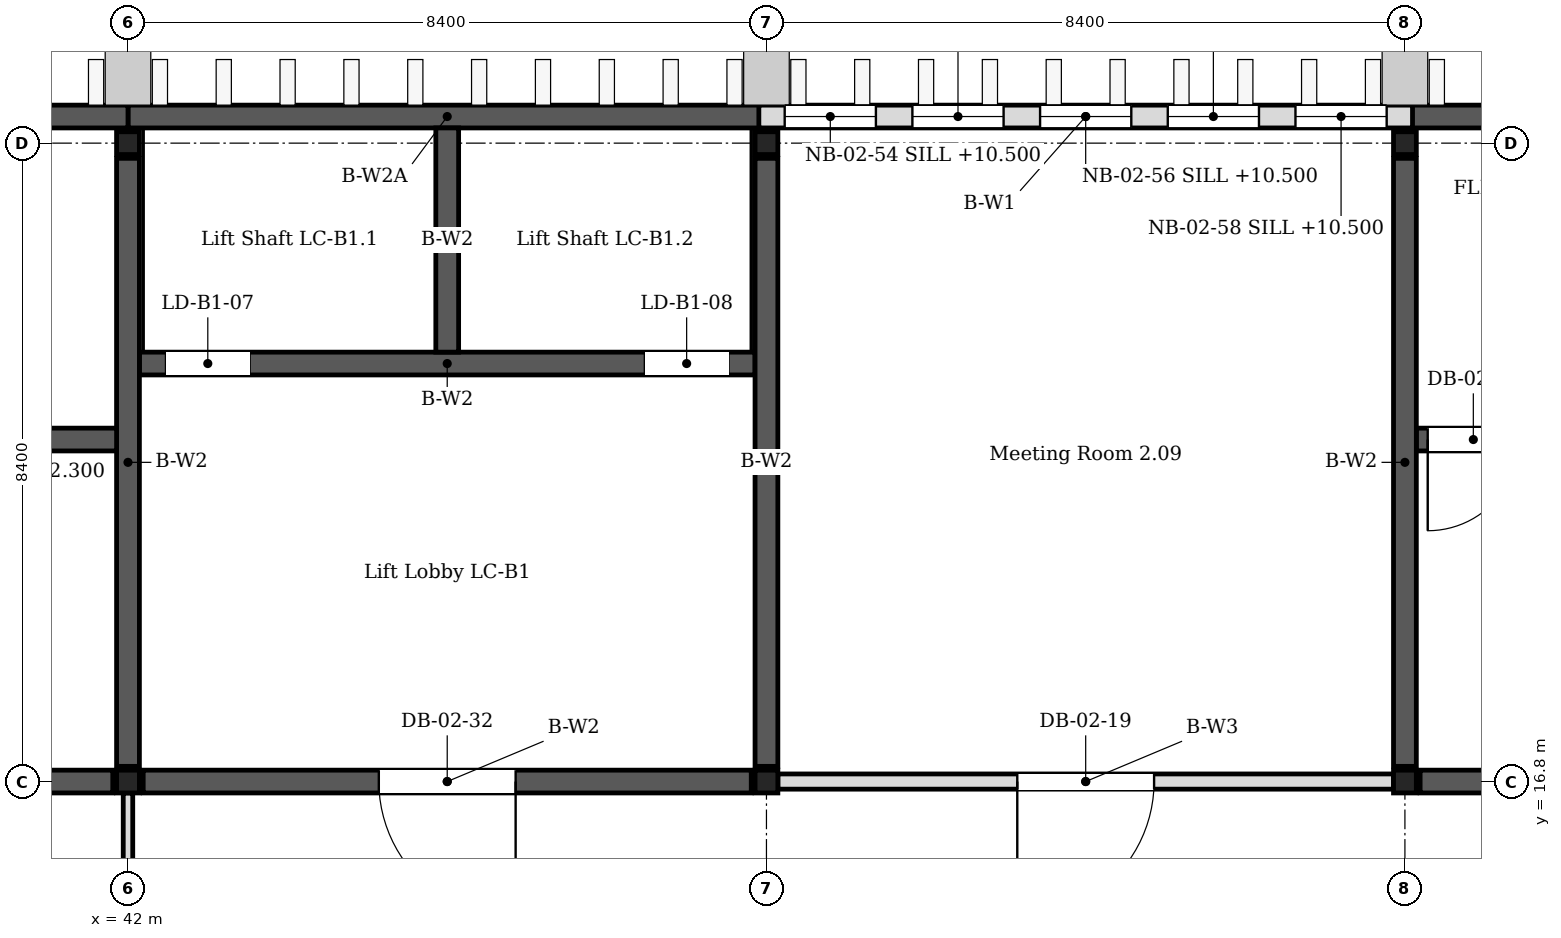
"""IFC4 building model, lengths in metres.
Left out: names, types, materials, properties, quantities, classifications, styles, units other than length and angle.
Written with IfcOpenShell. Run it as: python <this file> out.ifc"""

import sys

from ifc_helpers import new_model, si_unit, direction, frame, frame_2d, origin, origin_2d, place, context, subcontext, project, spatial, rectangle, i_section, extrude, element, fill, save


model = new_model("IFC4")
c1 = context("Model", 3, precision=1e-05, world=origin(), true_north=direction((0.0, 1.0)))
c2 = subcontext(c1, "Body", "Model", "MODEL_VIEW")
j1 = project(units=[si_unit("LENGTHUNIT", "METRE"), si_unit("PLANEANGLEUNIT", "RADIAN")], contexts=[c1])
p1 = place(None, origin())
s1 = spatial("IfcSite", under=j1, at=p1, CompositionType="ELEMENT")
p2 = place(p1, origin())
s2 = spatial("IfcBuilding", under=s1, at=p2, CompositionType="ELEMENT")
p3 = place(p2, frame((0.0, 0.0, 10.2)))
s3 = spatial("IfcBuildingStorey", under=s2, at=p3, CompositionType="ELEMENT", Elevation=10.2)
for number, where, z_axis, x_axis in (
    (1, (42.0, 16.8, 0.0), (0.0, 0.0, 1.0), (1.0, 0.0, 0.0)),
    (2, (42.0, 25.2, 0.0), (0.0, 0.0, 1.0), (1.0, 0.0, 0.0)),
    (3, (50.4, 16.8, 0.0), (0.0, 0.0, 1.0), (1.0, 0.0, 0.0)),
    (4, (50.4, 25.2, 0.0), (0.0, 0.0, 1.0), (1.0, 0.0, 0.0)),
    (5, (58.8, 16.8, 0.0), (0.0, 0.0, 1.0), (1.0, 0.0, 0.0)),
    (6, (58.8, 25.2, 0.0), (0.0, 0.0, 1.0), (1.0, 0.0, 0.0)),
):
    element("IfcColumn", number, at=place(p3, frame(where, z_axis=z_axis, x_axis=x_axis)), inside=s3, PredefinedType="COLUMN", context=c2, shape_type="SweptSolid", body=[
        extrude(i_section(OverallWidth=0.3, OverallDepth=0.3, WebThickness=0.01, FlangeThickness=0.015, FilletRadius=0.013, at=origin_2d()), origin(), (0.0, 0.0, 1.0), 4.2),
    ])
for number, where, z_axis, x_axis in (
    (7, (42.0, 17.0, 0.0), (0.0, 0.0, 1.0), (0.0, 1.0, 0.0)),
    (8, (50.4, 17.0, 0.0), (0.0, 0.0, 1.0), (0.0, 1.0, 0.0)),
):
    element("IfcWall", number, at=place(p3, frame(where, z_axis=z_axis, x_axis=x_axis)), inside=s3, PredefinedType="SHEAR", context=c2, shape_type="SweptSolid", body=[
        extrude(rectangle(XDim=8.0, YDim=0.3, at=frame_2d((4.0, 0.0))), origin(), (0.0, 0.0, 1.0), 4.05),
    ])
p4 = place(p3, frame((42.2, 16.8, 0.0), z_axis=(0.0, 0.0, 1.0), x_axis=(1.0, 0.0, 0.0)))
e9 = element("IfcWall", 9, at=p4, inside=s3, PredefinedType="SHEAR", context=c2, shape_type="SweptSolid", body=[
    extrude(rectangle(XDim=8.0, YDim=0.3, at=frame_2d((4.0, 0.0))), origin(), (0.0, 0.0, 1.0), 4.05),
])
p5 = place(p4, frame((3.1, 0.0, 0.0)))
e10 = element("IfcOpeningElement", 10, at=p5, cuts=e9, PredefinedType="OPENING", context=c2, shape_type="SweptSolid", body=[
    extrude(rectangle(XDim=1.8, YDim=2.1, at=frame_2d((0.9, 1.05))), frame((0.0, 0.16, 0.0), z_axis=(0.0, -1.0, 0.0), x_axis=(1.0, 0.0, 0.0)), (0.0, 0.0, 1.0), 0.32),
])
p6 = place(p3, frame((42.15, 22.3, 0.0), z_axis=(0.0, 0.0, 1.0), x_axis=(1.0, 0.0, 0.0)))
e11 = element("IfcWall", 11, at=p6, inside=s3, PredefinedType="SHEAR", context=c2, shape_type="SweptSolid", body=[
    extrude(rectangle(XDim=8.1, YDim=0.3, at=frame_2d((4.05, 0.0))), origin(), (0.0, 0.0, 1.0), 4.05),
])
p7 = place(p6, frame((0.35, 0.0, 0.0)))
e12 = element("IfcOpeningElement", 12, at=p7, cuts=e11, PredefinedType="OPENING", context=c2, shape_type="SweptSolid", body=[
    extrude(rectangle(XDim=1.1, YDim=2.2, at=frame_2d((0.55, 1.1))), frame((0.0, 0.16, 0.0), z_axis=(0.0, -1.0, 0.0), x_axis=(1.0, 0.0, 0.0)), (0.0, 0.0, 1.0), 0.32),
])
p8 = place(p6, frame((6.65, 0.0, 0.0)))
e13 = element("IfcOpeningElement", 13, at=p8, cuts=e11, PredefinedType="OPENING", context=c2, shape_type="SweptSolid", body=[
    extrude(rectangle(XDim=1.1, YDim=2.2, at=frame_2d((0.55, 1.1))), frame((0.0, 0.16, 0.0), z_axis=(0.0, -1.0, 0.0), x_axis=(1.0, 0.0, 0.0)), (0.0, 0.0, 1.0), 0.32),
])
p9 = place(p3, frame((42.0, 25.55, 0.0), z_axis=(0.0, 0.0, 1.0), x_axis=(1.0, 0.0, 0.0)))
e14 = element("IfcWall", 14, at=p9, inside=s3, PredefinedType="SHEAR", context=c2, shape_type="SweptSolid", body=[
    extrude(rectangle(XDim=8.4, YDim=0.3, at=frame_2d((4.2, 0.0))), origin(), (0.0, 0.0, 1.0), 4.05),
])
p10 = place(p3, frame((46.2, 22.45, 0.0), z_axis=(0.0, 0.0, 1.0), x_axis=(0.0, 1.0, 0.0)))
e15 = element("IfcWall", 15, at=p10, inside=s3, PredefinedType="SHEAR", context=c2, shape_type="SweptSolid", body=[
    extrude(rectangle(XDim=2.95, YDim=0.3, at=frame_2d((1.475, 0.0))), origin(), (0.0, 0.0, 1.0), 4.05),
])
p11 = place(p3, frame((33.8, 16.8, 0.0), z_axis=(0.0, 0.0, 1.0), x_axis=(1.0, 0.0, 0.0)))
e16 = element("IfcWall", 16, at=p11, inside=s3, PredefinedType="SHEAR", context=c2, shape_type="SweptSolid", body=[
    extrude(rectangle(XDim=8.0, YDim=0.3, at=frame_2d((4.0, 0.0))), origin(), (0.0, 0.0, 1.0), 4.05),
])
p12 = place(p11, frame((3.1, 0.0, 0.0)))
e17 = element("IfcOpeningElement", 17, at=p12, cuts=e16, PredefinedType="OPENING", context=c2, shape_type="SweptSolid", body=[
    extrude(rectangle(XDim=1.8, YDim=2.1, at=frame_2d((0.9, 1.05))), frame((0.0, 0.16, 0.0), z_axis=(0.0, -1.0, 0.0), x_axis=(1.0, 0.0, 0.0)), (0.0, 0.0, 1.0), 0.32),
])
p13 = place(p3, frame((33.75, 21.3, 0.0), z_axis=(0.0, 0.0, 1.0), x_axis=(1.0, 0.0, 0.0)))
e18 = element("IfcWall", 18, at=p13, inside=s3, PredefinedType="SHEAR", context=c2, shape_type="SweptSolid", body=[
    extrude(rectangle(XDim=8.1, YDim=0.3, at=frame_2d((4.05, 0.0))), origin(), (0.0, 0.0, 1.0), 4.05),
])
p14 = place(p13, frame((0.15, 0.0, 0.0)))
e19 = element("IfcOpeningElement", 19, at=p14, cuts=e18, PredefinedType="OPENING", context=c2, shape_type="SweptSolid", body=[
    extrude(rectangle(XDim=1.2, YDim=2.1, at=frame_2d((0.6, 1.05))), frame((0.0, 0.16, 0.0), z_axis=(0.0, -1.0, 0.0), x_axis=(1.0, 0.0, 0.0)), (0.0, 0.0, 1.0), 0.32),
])
p15 = place(p3, frame((33.6, 25.55, 0.0), z_axis=(0.0, 0.0, 1.0), x_axis=(1.0, 0.0, 0.0)))
e20 = element("IfcWall", 20, at=p15, inside=s3, PredefinedType="SHEAR", context=c2, shape_type="SweptSolid", body=[
    extrude(rectangle(XDim=8.4, YDim=0.3, at=frame_2d((4.2, 0.0))), origin(), (0.0, 0.0, 1.0), 4.05),
])
p16 = place(p3, frame((58.8, 17.0, 0.0), z_axis=(0.0, 0.0, 1.0), x_axis=(0.0, 1.0, 0.0)))
e21 = element("IfcWall", 21, at=p16, inside=s3, PredefinedType="SHEAR", context=c2, shape_type="SweptSolid", body=[
    extrude(rectangle(XDim=8.0, YDim=0.3, at=frame_2d((4.0, 0.0))), origin(), (0.0, 0.0, 1.0), 4.05),
])
p17 = place(p3, frame((59.0, 16.8, 0.0), z_axis=(0.0, 0.0, 1.0), x_axis=(1.0, 0.0, 0.0)))
e22 = element("IfcWall", 22, at=p17, inside=s3, PredefinedType="SHEAR", context=c2, shape_type="SweptSolid", body=[
    extrude(rectangle(XDim=8.0, YDim=0.3, at=frame_2d((4.0, 0.0))), origin(), (0.0, 0.0, 1.0), 4.05),
])
p18 = place(p17, frame((3.1, 0.0, 0.0)))
e23 = element("IfcOpeningElement", 23, at=p18, cuts=e22, PredefinedType="OPENING", context=c2, shape_type="SweptSolid", body=[
    extrude(rectangle(XDim=1.8, YDim=2.1, at=frame_2d((0.9, 1.05))), frame((0.0, 0.16, 0.0), z_axis=(0.0, -1.0, 0.0), x_axis=(1.0, 0.0, 0.0)), (0.0, 0.0, 1.0), 0.32),
])
p19 = place(p3, frame((58.95, 21.3, 0.0), z_axis=(0.0, 0.0, 1.0), x_axis=(1.0, 0.0, 0.0)))
e24 = element("IfcWall", 24, at=p19, inside=s3, PredefinedType="SHEAR", context=c2, shape_type="SweptSolid", body=[
    extrude(rectangle(XDim=8.1, YDim=0.3, at=frame_2d((4.05, 0.0))), origin(), (0.0, 0.0, 1.0), 4.05),
])
p20 = place(p19, frame((0.15, 0.0, 0.0)))
e25 = element("IfcOpeningElement", 25, at=p20, cuts=e24, PredefinedType="OPENING", context=c2, shape_type="SweptSolid", body=[
    extrude(rectangle(XDim=1.2, YDim=2.1, at=frame_2d((0.6, 1.05))), frame((0.0, 0.16, 0.0), z_axis=(0.0, -1.0, 0.0), x_axis=(1.0, 0.0, 0.0)), (0.0, 0.0, 1.0), 0.32),
])
p21 = place(p3, frame((58.8, 25.55, 0.0), z_axis=(0.0, 0.0, 1.0), x_axis=(1.0, 0.0, 0.0)))
e26 = element("IfcWall", 26, at=p21, inside=s3, PredefinedType="SHEAR", context=c2, shape_type="SweptSolid", body=[
    extrude(rectangle(XDim=8.4, YDim=0.3, at=frame_2d((4.2, 0.0))), origin(), (0.0, 0.0, 1.0), 4.05),
])
p22 = place(p3, frame((50.3, 25.55, 0.0), z_axis=(0.0, 0.0, 1.0), x_axis=(1.0, 0.0, 0.0)))
e27 = element("IfcWall", 27, at=p22, inside=s3, PredefinedType="SOLIDWALL", context=c2, shape_type="SweptSolid", body=[
    extrude(rectangle(XDim=8.6, YDim=0.3, at=frame_2d((4.3, 0.0))), origin(), (0.0, 0.0, 1.0), 4.05),
])
p23 = place(p22, frame((0.34, 0.0, 0.3)))
e28 = element("IfcOpeningElement", 28, at=p23, cuts=e27, PredefinedType="OPENING", context=c2, shape_type="SweptSolid", body=[
    extrude(rectangle(XDim=1.2, YDim=3.3, at=frame_2d((0.6, 1.65))), frame((0.0, 0.16, 0.0), z_axis=(0.0, -1.0, 0.0), x_axis=(1.0, 0.0, 0.0)), (0.0, 0.0, 1.0), 0.32),
])
p24 = place(p22, frame((2.02, 0.0, 0.3)))
e29 = element("IfcOpeningElement", 29, at=p24, cuts=e27, PredefinedType="OPENING", context=c2, shape_type="SweptSolid", body=[
    extrude(rectangle(XDim=1.2, YDim=3.3, at=frame_2d((0.6, 1.65))), frame((0.0, 0.16, 0.0), z_axis=(0.0, -1.0, 0.0), x_axis=(1.0, 0.0, 0.0)), (0.0, 0.0, 1.0), 0.32),
])
p25 = place(p22, frame((3.7, 0.0, 0.3)))
e30 = element("IfcOpeningElement", 30, at=p25, cuts=e27, PredefinedType="OPENING", context=c2, shape_type="SweptSolid", body=[
    extrude(rectangle(XDim=1.2, YDim=3.3, at=frame_2d((0.6, 1.65))), frame((0.0, 0.16, 0.0), z_axis=(0.0, -1.0, 0.0), x_axis=(1.0, 0.0, 0.0)), (0.0, 0.0, 1.0), 0.32),
])
p26 = place(p22, frame((5.38, 0.0, 0.3)))
e31 = element("IfcOpeningElement", 31, at=p26, cuts=e27, PredefinedType="OPENING", context=c2, shape_type="SweptSolid", body=[
    extrude(rectangle(XDim=1.2, YDim=3.3, at=frame_2d((0.6, 1.65))), frame((0.0, 0.16, 0.0), z_axis=(0.0, -1.0, 0.0), x_axis=(1.0, 0.0, 0.0)), (0.0, 0.0, 1.0), 0.32),
])
p27 = place(p22, frame((7.06, 0.0, 0.3)))
e32 = element("IfcOpeningElement", 32, at=p27, cuts=e27, PredefinedType="OPENING", context=c2, shape_type="SweptSolid", body=[
    extrude(rectangle(XDim=1.2, YDim=3.3, at=frame_2d((0.6, 1.65))), frame((0.0, 0.16, 0.0), z_axis=(0.0, -1.0, 0.0), x_axis=(1.0, 0.0, 0.0)), (0.0, 0.0, 1.0), 0.32),
])
p28 = place(p3, frame((50.55, 16.8, 0.0), z_axis=(0.0, 0.0, 1.0), x_axis=(1.0, 0.0, 0.0)))
e33 = element("IfcWall", 33, at=p28, inside=s3, PredefinedType="PARTITIONING", context=c2, shape_type="SweptSolid", body=[
    extrude(rectangle(XDim=8.1, YDim=0.2, at=frame_2d((4.05, 0.0))), origin(), (0.0, 0.0, 1.0), 3.35),
])
p29 = place(p28, frame((3.15, 0.0, 0.0)))
e34 = element("IfcOpeningElement", 34, at=p29, cuts=e33, PredefinedType="OPENING", context=c2, shape_type="SweptSolid", body=[
    extrude(rectangle(XDim=1.8, YDim=2.1, at=frame_2d((0.9, 1.05))), frame((0.0, 0.11, 0.0), z_axis=(0.0, -1.0, 0.0), x_axis=(1.0, 0.0, 0.0)), (0.0, 0.0, 1.0), 0.22),
])
p30 = place(p3, frame((42.0, 8.55, 0.0), z_axis=(0.0, 0.0, 1.0), x_axis=(0.0, 1.0, 0.0)))
e35 = element("IfcWall", 35, at=p30, inside=s3, PredefinedType="PARTITIONING", context=c2, shape_type="SweptSolid", body=[
    extrude(rectangle(XDim=8.1, YDim=0.125, at=frame_2d((4.05, 0.0))), origin(), (0.0, 0.0, 1.0), 3.35),
])
p31 = place(p30, frame((2.85, 0.0, 0.0)))
e36 = element("IfcOpeningElement", 36, at=p31, cuts=e35, PredefinedType="OPENING", context=c2, shape_type="SweptSolid", body=[
    extrude(rectangle(XDim=2.4, YDim=2.2, at=frame_2d((1.2, 1.1))), frame((0.0, 0.073, 0.0), z_axis=(0.0, -1.0, 0.0), x_axis=(1.0, 0.0, 0.0)), (0.0, 0.0, 1.0), 0.145),
])
p32 = place(p23, origin())
e37 = element("IfcWindow", 37, at=p32, inside=s3, PartitioningType="TRIPLE_PANEL_VERTICAL", PredefinedType="WINDOW", context=c2, shape_type="SweptSolid", body=[
    extrude(rectangle(XDim=1.2, YDim=3.3, at=frame_2d((0.6, 1.65))), frame((0.0, 0.03, 0.0), z_axis=(0.0, -1.0, 0.0), x_axis=(1.0, 0.0, 0.0)), (0.0, 0.0, 1.0), 0.06),
])
fill(e28, e37)
p33 = place(p24, origin())
e38 = element("IfcWindow", 38, at=p33, inside=s3, PartitioningType="TRIPLE_PANEL_VERTICAL", PredefinedType="WINDOW", context=c2, shape_type="SweptSolid", body=[
    extrude(rectangle(XDim=1.2, YDim=3.3, at=frame_2d((0.6, 1.65))), frame((0.0, 0.03, 0.0), z_axis=(0.0, -1.0, 0.0), x_axis=(1.0, 0.0, 0.0)), (0.0, 0.0, 1.0), 0.06),
])
fill(e29, e38)
p34 = place(p25, origin())
e39 = element("IfcWindow", 39, at=p34, inside=s3, PartitioningType="TRIPLE_PANEL_VERTICAL", PredefinedType="WINDOW", context=c2, shape_type="SweptSolid", body=[
    extrude(rectangle(XDim=1.2, YDim=3.3, at=frame_2d((0.6, 1.65))), frame((0.0, 0.03, 0.0), z_axis=(0.0, -1.0, 0.0), x_axis=(1.0, 0.0, 0.0)), (0.0, 0.0, 1.0), 0.06),
])
fill(e30, e39)
p35 = place(p26, origin())
e40 = element("IfcWindow", 40, at=p35, inside=s3, PartitioningType="TRIPLE_PANEL_VERTICAL", PredefinedType="WINDOW", context=c2, shape_type="SweptSolid", body=[
    extrude(rectangle(XDim=1.2, YDim=3.3, at=frame_2d((0.6, 1.65))), frame((0.0, 0.03, 0.0), z_axis=(0.0, -1.0, 0.0), x_axis=(1.0, 0.0, 0.0)), (0.0, 0.0, 1.0), 0.06),
])
fill(e31, e40)
p36 = place(p27, origin())
e41 = element("IfcWindow", 41, at=p36, inside=s3, PartitioningType="TRIPLE_PANEL_VERTICAL", PredefinedType="WINDOW", context=c2, shape_type="SweptSolid", body=[
    extrude(rectangle(XDim=1.2, YDim=3.3, at=frame_2d((0.6, 1.65))), frame((0.0, 0.03, 0.0), z_axis=(0.0, -1.0, 0.0), x_axis=(1.0, 0.0, 0.0)), (0.0, 0.0, 1.0), 0.06),
])
fill(e32, e41)
p37 = place(p29, origin())
e42 = element("IfcDoor", 42, at=p37, inside=s3, OperationType="DOUBLE_DOOR_SINGLE_SWING", PredefinedType="DOOR", context=c2, shape_type="SweptSolid", body=[
    extrude(rectangle(XDim=1.8, YDim=2.1, at=frame_2d((0.9, 1.05))), frame((0.0, 0.025, 0.0), z_axis=(0.0, -1.0, 0.0), x_axis=(1.0, 0.0, 0.0)), (0.0, 0.0, 1.0), 0.05),
])
fill(e34, e42)
p38 = place(p5, origin())
e43 = element("IfcDoor", 43, at=p38, inside=s3, OperationType="DOUBLE_DOOR_SINGLE_SWING", PredefinedType="DOOR", context=c2, shape_type="SweptSolid", body=[
    extrude(rectangle(XDim=1.8, YDim=2.1, at=frame_2d((0.9, 1.05))), frame((0.0, 0.025, 0.0), z_axis=(0.0, -1.0, 0.0), x_axis=(1.0, 0.0, 0.0)), (0.0, 0.0, 1.0), 0.05),
])
fill(e10, e43)
p39 = place(p7, origin())
e44 = element("IfcDoor", 44, at=p39, inside=s3, OperationType="SLIDING_TO_LEFT", PredefinedType="DOOR", context=c2, shape_type="SweptSolid", body=[
    extrude(rectangle(XDim=1.1, YDim=2.2, at=frame_2d((0.55, 1.1))), frame((0.0, 0.025, 0.0), z_axis=(0.0, -1.0, 0.0), x_axis=(1.0, 0.0, 0.0)), (0.0, 0.0, 1.0), 0.05),
])
fill(e12, e44)
p40 = place(p8, origin())
e45 = element("IfcDoor", 45, at=p40, inside=s3, OperationType="SLIDING_TO_LEFT", PredefinedType="DOOR", context=c2, shape_type="SweptSolid", body=[
    extrude(rectangle(XDim=1.1, YDim=2.2, at=frame_2d((0.55, 1.1))), frame((0.0, 0.025, 0.0), z_axis=(0.0, -1.0, 0.0), x_axis=(1.0, 0.0, 0.0)), (0.0, 0.0, 1.0), 0.05),
])
fill(e13, e45)
p41 = place(p20, origin())
e46 = element("IfcDoor", 46, at=p41, inside=s3, OperationType="SINGLE_SWING_LEFT", PredefinedType="DOOR", context=c2, shape_type="SweptSolid", body=[
    extrude(rectangle(XDim=1.2, YDim=2.1, at=frame_2d((0.6, 1.05))), frame((0.0, 0.025, 0.0), z_axis=(0.0, -1.0, 0.0), x_axis=(1.0, 0.0, 0.0)), (0.0, 0.0, 1.0), 0.05),
])
fill(e25, e46)
save(model, sys.argv[1])
